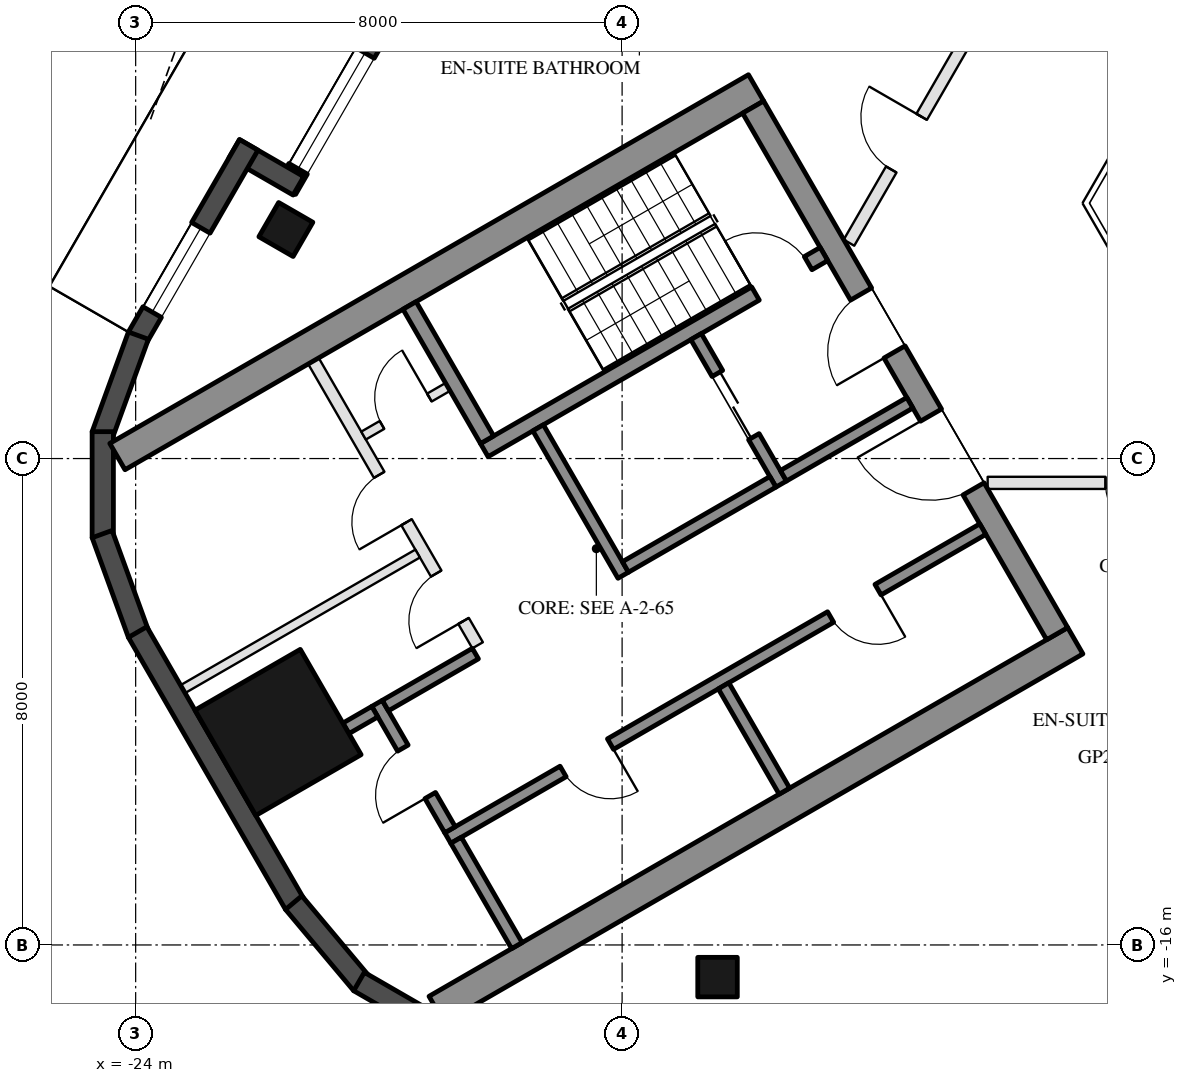
"""IFC4 building model, lengths in metres.
Left out: names, types, materials, properties, quantities, classifications, styles, units other than length and angle.
Written with IfcOpenShell. Run it as: python <this file> out.ifc"""

import sys

from ifc_helpers import new_model, si_unit, direction, frame, frame_2d, origin, origin_2d, place, context, subcontext, project, spatial, rectangle, hollow_rectangle, extrude, boolean, halfspace, element, fill, save


model = new_model("IFC4")
c1 = context("Model", 3, precision=1e-05, world=origin(), true_north=direction((0.0, 1.0)))
c2 = subcontext(c1, "Body", "Model", "MODEL_VIEW")
j1 = project(units=[si_unit("LENGTHUNIT", "METRE"), si_unit("PLANEANGLEUNIT", "RADIAN")], contexts=[c1])
p1 = place(None, origin())
s1 = spatial("IfcSite", under=j1, at=p1, CompositionType="ELEMENT")
p2 = place(p1, origin())
s2 = spatial("IfcBuilding", under=s1, at=p2, CompositionType="ELEMENT")
p3 = place(p2, frame((0.0, 0.0, 283.7)))
s3 = spatial("IfcBuildingStorey", under=s2, at=p3, CompositionType="ELEMENT", Elevation=283.7)
for number, where, z_axis, x_axis in (
    (1, (-14.431, -16.529, 0.0), (0.0, 0.0, 1.0), (-1.0, 0.0, 0.0)),
    (2, (-21.53, -4.233, 0.0), (0.0, 0.0, 1.0), (0.5, 0.866, 0.0)),
):
    element("IfcColumn", number, at=place(p3, frame(where, z_axis=z_axis, x_axis=x_axis)), inside=s3, PredefinedType="COLUMN", context=c2, shape_type="SweptSolid", body=[
        boolean("DIFFERENCE", extrude(hollow_rectangle(XDim=0.65, YDim=0.65, WallThickness=0.03, at=origin_2d()), origin(), (0.0, 0.0, 1.0), 3.7), halfspace(frame((0.0, 0.0, 3.653), z_axis=(0.0, 0.0, 1.0), x_axis=(1.0, 0.0, 0.0)), False)),
    ])
p4 = place(p3, frame((-21.658, -12.504, 0.0), z_axis=(0.0, 0.0, 1.0), x_axis=(-0.5, 0.866025403784, 0.0)))
e3 = element("IfcColumn", 3, at=p4, inside=s3, PredefinedType="COLUMN", context=c2, shape_type="SweptSolid", body=[
    boolean("DIFFERENCE", extrude(hollow_rectangle(XDim=2.0, YDim=2.0, WallThickness=0.05, at=origin_2d()), origin(), (0.0, 0.0, 1.0), 3.7), halfspace(frame((0.0, 0.0, 3.587), z_axis=(0.0, 0.0, 1.0), x_axis=(1.0, 0.0, 0.0)), False)),
])
p5 = place(p3, frame((-18.493, 1.676, 0.0), z_axis=(0.0, 0.0, 1.0), x_axis=(-0.499985371027, -0.866033849661, 0.0)))
e4 = element("IfcWall", 4, at=p5, inside=s3, PredefinedType="SOLIDWALL", context=c2, shape_type="SweptSolid", body=[
    extrude(rectangle(XDim=6.055, YDim=0.35, at=frame_2d((3.028, 0.0))), origin(), (0.0, 0.0, 1.0), 3.55),
])
p6 = place(p5, frame((0.77, 0.0, 0.0)))
e5 = element("IfcOpeningElement", 5, at=p6, cuts=e4, PredefinedType="OPENING", context=c2, shape_type="SweptSolid", body=[
    extrude(rectangle(XDim=2.4, YDim=2.4, at=frame_2d((1.2, 1.2))), frame((0.0, 0.185, 0.0), z_axis=(0.0, -1.0, 0.0), x_axis=(1.0, 0.0, 0.0)), (0.0, 0.0, 1.0), 0.37),
])
p7 = place(p5, frame((3.47, 0.0, 0.3)))
e6 = element("IfcOpeningElement", 6, at=p7, cuts=e4, PredefinedType="OPENING", context=c2, shape_type="SweptSolid", body=[
    extrude(rectangle(XDim=2.2, YDim=2.65, at=frame_2d((1.1, 1.325))), frame((0.0, 0.185, 0.0), z_axis=(0.0, -1.0, 0.0), x_axis=(1.0, 0.0, 0.0)), (0.0, 0.0, 1.0), 0.37),
])
p8 = place(p3, frame((-21.323, -3.515, 0.0), z_axis=(0.0, 0.0, 1.0), x_axis=(-0.866092288191, 0.499884134912, 0.0)))
e7 = element("IfcWall", 7, at=p8, inside=s3, PredefinedType="SOLIDWALL", context=c2, shape_type="SweptSolid", body=[
    extrude(rectangle(XDim=1.22, YDim=0.35, at=frame_2d((0.61, 0.0))), origin(), (0.0, 0.0, 1.0), 3.55),
])
p9 = place(p3, frame((-22.14, -2.841, 0.0), z_axis=(0.0, 0.0, 1.0), x_axis=(-0.500040506767, -0.866002015928, 0.0)))
e8 = element("IfcWall", 8, at=p9, inside=s3, PredefinedType="SOLIDWALL", context=c2, shape_type="SweptSolid", body=[
    extrude(rectangle(XDim=3.655, YDim=0.35, at=frame_2d((1.827, 0.0))), origin(), (0.0, 0.0, 1.0), 3.55),
])
p10 = place(p9, frame((1.575, 0.0, 0.3)))
e9 = element("IfcOpeningElement", 9, at=p10, cuts=e8, PredefinedType="OPENING", context=c2, shape_type="SweptSolid", body=[
    extrude(rectangle(XDim=1.6, YDim=2.65, at=frame_2d((0.8, 1.325))), frame((0.0, 0.185, 0.0), z_axis=(0.0, -1.0, 0.0), x_axis=(1.0, 0.0, 0.0)), (0.0, 0.0, 1.0), 0.37),
])
for number, where, z_axis, x_axis in (
    (10, (-23.955, -5.978, 0.0), (0.0, 0.0, 1.0), (-0.342, -0.94, 0.0)),
    (11, (-24.541, -7.558, 0.0), (0.0, 0.0, 1.0), (0.0, -1.0, 0.0)),
    (12, (-24.552, -9.242, 0.0), (0.0, 0.0, 1.0), (0.342, -0.94, 0.0)),
):
    element("IfcWall", number, at=place(p3, frame(where, z_axis=z_axis, x_axis=x_axis)), inside=s3, PredefinedType="SOLIDWALL", context=c2, shape_type="SweptSolid", body=[
        extrude(rectangle(XDim=1.745, YDim=0.35, at=frame_2d((0.872, 0.0))), origin(), (0.0, 0.0, 1.0), 3.55),
    ])
p11 = place(p3, frame((-23.968, -10.854, 0.0), z_axis=(0.0, 0.0, 1.0), x_axis=(0.500020983425, -0.866013288659, 0.0)))
e13 = element("IfcWall", 13, at=p11, inside=s3, PredefinedType="SOLIDWALL", context=c2, shape_type="SweptSolid", body=[
    extrude(rectangle(XDim=5.168, YDim=0.35, at=frame_2d((2.584, 0.0))), origin(), (0.0, 0.0, 1.0), 3.55),
])
for number, where, z_axis, x_axis in (
    (14, (-21.401, -15.305, 0.0), (0.0, 0.0, 1.0), (0.643, -0.766, 0.0)),
    (15, (-20.327, -16.602, 0.0), (0.0, 0.0, 1.0), (0.866, -0.5, 0.0)),
):
    element("IfcWall", number, at=place(p3, frame(where, z_axis=z_axis, x_axis=x_axis)), inside=s3, PredefinedType="SOLIDWALL", context=c2, shape_type="SweptSolid", body=[
        extrude(rectangle(XDim=1.745, YDim=0.35, at=frame_2d((0.872, 0.0))), origin(), (0.0, 0.0, 1.0), 3.55),
    ])
for number, where, z_axis, x_axis in (
    (16, (-13.797, -1.903, 0.0), (0.0, 0.0, 1.0), (-0.866, -0.5, 0.0)),
    (17, (-8.547, -10.997, 0.0), (0.0, 0.0, 1.0), (-0.866, -0.5, 0.0)),
):
    element("IfcWall", number, at=place(p3, frame(where, z_axis=z_axis, x_axis=x_axis)), inside=s3, PredefinedType="SHEAR", context=c2, shape_type="SweptSolid", body=[
        extrude(rectangle(XDim=12.129, YDim=0.5, at=frame_2d((6.064, 0.0))), origin(), (0.0, 0.0, 1.0), 3.5),
    ])
p12 = place(p3, frame((-13.845, -2.22, 0.0), z_axis=(0.0, 0.0, 1.0), x_axis=(0.500004234368, -0.866022959057, 0.0)))
e18 = element("IfcWall", 18, at=p12, inside=s3, PredefinedType="SHEAR", context=c2, shape_type="SweptSolid", body=[
    extrude(rectangle(XDim=10.0, YDim=0.4, at=frame_2d((5.0, 0.0))), origin(), (0.0, 0.0, 1.0), 3.5),
])
p13 = place(p12, frame((3.55, 0.0, 0.0)))
e19 = element("IfcOpeningElement", 19, at=p13, cuts=e18, PredefinedType="OPENING", context=c2, shape_type="SweptSolid", body=[
    extrude(rectangle(XDim=1.1, YDim=2.1, at=frame_2d((0.55, 1.05))), frame((0.0, 0.21, 0.0), z_axis=(0.0, -1.0, 0.0), x_axis=(1.0, 0.0, 0.0)), (0.0, 0.0, 1.0), 0.42),
])
p14 = place(p12, frame((5.85, 0.0, 0.0)))
e20 = element("IfcOpeningElement", 20, at=p14, cuts=e18, PredefinedType="OPENING", context=c2, shape_type="SweptSolid", body=[
    extrude(rectangle(XDim=1.4, YDim=2.1, at=frame_2d((0.7, 1.05))), frame((0.0, 0.21, 0.0), z_axis=(0.0, -1.0, 0.0), x_axis=(1.0, 0.0, 0.0)), (0.0, 0.0, 1.0), 0.42),
])
p15 = place(p3, frame((-12.681, -4.636, 0.0), z_axis=(0.0, 0.0, 1.0), x_axis=(-0.866021702275, -0.500006411147, 0.0)))
e21 = element("IfcWall", 21, at=p15, inside=s3, PredefinedType="SHEAR", context=c2, shape_type="SweptSolid", body=[
    extrude(rectangle(XDim=6.45, YDim=0.25, at=frame_2d((3.225, 0.0))), origin(), (0.0, 0.0, 1.0), 3.5),
])
p16 = place(p15, frame((0.3, 0.0, 0.0)))
e22 = element("IfcOpeningElement", 22, at=p16, cuts=e21, PredefinedType="OPENING", context=c2, shape_type="SweptSolid", body=[
    extrude(rectangle(XDim=1.0, YDim=2.1, at=frame_2d((0.5, 1.05))), frame((0.0, 0.135, 0.0), z_axis=(0.0, -1.0, 0.0), x_axis=(1.0, 0.0, 0.0)), (0.0, 0.0, 1.0), 0.27),
])
p17 = place(p3, frame((-19.496, -5.482, 0.0), z_axis=(0.0, 0.0, 1.0), x_axis=(0.499990435942, -0.866030925526, 0.0)))
e23 = element("IfcWall", 23, at=p17, inside=s3, PredefinedType="SHEAR", context=c2, shape_type="SweptSolid", body=[
    extrude(rectangle(XDim=2.55, YDim=0.25, at=frame_2d((1.275, 0.0))), origin(), (0.0, 0.0, 1.0), 3.5),
])
p18 = place(p3, frame((-17.381, -7.495, 0.0), z_axis=(0.0, 0.0, 1.0), x_axis=(0.500011755427, -0.866018616679, 0.0)))
e24 = element("IfcWall", 24, at=p18, inside=s3, PredefinedType="SHEAR", context=c2, shape_type="SweptSolid", body=[
    extrude(rectangle(XDim=2.8, YDim=0.2, at=frame_2d((1.4, 0.0))), origin(), (0.0, 0.0, 1.0), 3.5),
])
p19 = place(p3, frame((-14.783, -5.995, 0.0), z_axis=(0.0, 0.0, 1.0), x_axis=(0.49994636267, -0.866056369097, 0.0)))
e25 = element("IfcWall", 25, at=p19, inside=s3, PredefinedType="SHEAR", context=c2, shape_type="SweptSolid", body=[
    extrude(rectangle(XDim=2.8, YDim=0.2, at=frame_2d((1.4, 0.0))), origin(), (0.0, 0.0, 1.0), 3.5),
])
p20 = place(p19, frame((0.7, 0.0, 0.0)))
e26 = element("IfcOpeningElement", 26, at=p20, cuts=e25, PredefinedType="OPENING", context=c2, shape_type="SweptSolid", body=[
    extrude(rectangle(XDim=1.2, YDim=2.1, at=frame_2d((0.6, 1.05))), frame((0.0, 0.11, 0.0), z_axis=(0.0, -1.0, 0.0), x_axis=(1.0, 0.0, 0.0)), (0.0, 0.0, 1.0), 0.22),
])
p21 = place(p3, frame((-13.52, -8.383, 0.0), z_axis=(0.0, 0.0, 1.0), x_axis=(-0.866034573852, -0.49998411664, 0.0)))
e27 = element("IfcWall", 27, at=p21, inside=s3, PredefinedType="SHEAR", context=c2, shape_type="SweptSolid", body=[
    extrude(rectangle(XDim=2.8, YDim=0.2, at=frame_2d((1.4, 0.0))), origin(), (0.0, 0.0, 1.0), 3.5),
])
p22 = place(p3, frame((-11.268, -7.083, 0.0), z_axis=(0.0, 0.0, 1.0), x_axis=(-0.866050077142, -0.499957262057, 0.0)))
e28 = element("IfcWall", 28, at=p22, inside=s3, PredefinedType="SHEAR", context=c2, shape_type="SweptSolid", body=[
    extrude(rectangle(XDim=2.4, YDim=0.2, at=frame_2d((1.2, 0.0))), origin(), (0.0, 0.0, 1.0), 3.5),
])
p23 = place(p3, frame((-10.068, -9.162, 0.0), z_axis=(0.0, 0.0, 1.0), x_axis=(-0.866032725843, -0.499987317609, 0.0)))
e29 = element("IfcWall", 29, at=p23, inside=s3, PredefinedType="SHEAR", context=c2, shape_type="SweptSolid", body=[
    extrude(rectangle(XDim=10.16, YDim=0.2, at=frame_2d((5.08, 0.0))), origin(), (0.0, 0.0, 1.0), 3.5),
])
p24 = place(p23, frame((1.99, 0.0, 0.0)))
e30 = element("IfcOpeningElement", 30, at=p24, cuts=e29, PredefinedType="OPENING", context=c2, shape_type="SweptSolid", body=[
    extrude(rectangle(XDim=0.9, YDim=2.1, at=frame_2d((0.45, 1.05))), frame((0.0, 0.11, 0.0), z_axis=(0.0, -1.0, 0.0), x_axis=(1.0, 0.0, 0.0)), (0.0, 0.0, 1.0), 0.22),
])
p25 = place(p23, frame((7.07, 0.0, 0.0)))
e31 = element("IfcOpeningElement", 31, at=p25, cuts=e29, PredefinedType="OPENING", context=c2, shape_type="SweptSolid", body=[
    extrude(rectangle(XDim=0.9, YDim=2.1, at=frame_2d((0.45, 1.05))), frame((0.0, 0.11, 0.0), z_axis=(0.0, -1.0, 0.0), x_axis=(1.0, 0.0, 0.0)), (0.0, 0.0, 1.0), 0.22),
])
p26 = place(p3, frame((-20.031, -12.026, 0.0), z_axis=(0.0, 0.0, 1.0), x_axis=(0.500033551112, -0.866006032174, 0.0)))
e32 = element("IfcWall", 32, at=p26, inside=s3, PredefinedType="SHEAR", context=c2, shape_type="SweptSolid", body=[
    extrude(rectangle(XDim=2.4, YDim=0.2, at=frame_2d((1.2, 0.0))), origin(), (0.0, 0.0, 1.0), 3.5),
])
p27 = place(p26, frame((0.85, 0.0, 0.0)))
e33 = element("IfcOpeningElement", 33, at=p27, cuts=e32, PredefinedType="OPENING", context=c2, shape_type="SweptSolid", body=[
    extrude(rectangle(XDim=0.9, YDim=2.1, at=frame_2d((0.45, 1.05))), frame((0.0, 0.11, 0.0), z_axis=(0.0, -1.0, 0.0), x_axis=(1.0, 0.0, 0.0)), (0.0, 0.0, 1.0), 0.22),
])
p28 = place(p3, frame((-18.413, -11.208, 0.0), z_axis=(0.0, 0.0, 1.0), x_axis=(-0.866038183914, -0.499977863513, 0.0)))
e34 = element("IfcWall", 34, at=p28, inside=s3, PredefinedType="SHEAR", context=c2, shape_type="SweptSolid", body=[
    extrude(rectangle(XDim=1.71, YDim=0.2, at=frame_2d((0.855, 0.0))), origin(), (0.0, 0.0, 1.0), 3.5),
])
for number, where, z_axis, x_axis in (
    (35, (-14.331, -11.738, 0.0), (0.0, 0.0, 1.0), (0.5, -0.866, 0.0)),
    (36, (-18.73, -14.278, 0.0), (0.0, 0.0, 1.0), (0.5, -0.866, 0.0)),
):
    element("IfcWall", number, at=place(p3, frame(where, z_axis=z_axis, x_axis=x_axis)), inside=s3, PredefinedType="SHEAR", context=c2, shape_type="SweptSolid", body=[
        extrude(rectangle(XDim=2.0, YDim=0.2, at=frame_2d((1.0, 0.0))), origin(), (0.0, 0.0, 1.0), 3.5),
    ])
p29 = place(p3, frame((-20.067, -12.163, 0.0), z_axis=(0.0, 0.0, 1.0), x_axis=(-0.866044851585, -0.499966313909, 0.0)))
e37 = element("IfcWall", 37, at=p29, inside=s3, PredefinedType="SHEAR", context=c2, shape_type="SweptSolid", body=[
    extrude(rectangle(XDim=0.549, YDim=0.2, at=frame_2d((0.274, 0.0))), origin(), (0.0, 0.0, 1.0), 3.5),
])
p30 = place(p3, frame((-21.076, -6.395, 0.0), z_axis=(0.0, 0.0, 1.0), x_axis=(0.50001468107, -0.866016927499, 0.0)))
e38 = element("IfcWall", 38, at=p30, inside=s3, PredefinedType="PARTITIONING", context=c2, shape_type="SweptSolid", body=[
    extrude(rectangle(XDim=5.4, YDim=0.2, at=frame_2d((2.7, 0.0))), origin(), (0.0, 0.0, 1.0), 3.5),
])
p31 = place(p30, frame((2.163, 0.0, 0.0)))
e39 = element("IfcOpeningElement", 39, at=p31, cuts=e38, PredefinedType="OPENING", context=c2, shape_type="SweptSolid", body=[
    extrude(rectangle(XDim=0.9, YDim=2.1, at=frame_2d((0.45, 1.05))), frame((0.0, 0.11, 0.0), z_axis=(0.0, -1.0, 0.0), x_axis=(1.0, 0.0, 0.0)), (0.0, 0.0, 1.0), 0.22),
])
p32 = place(p30, frame((4.038, 0.0, 0.0)))
e40 = element("IfcOpeningElement", 40, at=p32, cuts=e38, PredefinedType="OPENING", context=c2, shape_type="SweptSolid", body=[
    extrude(rectangle(XDim=0.9, YDim=2.1, at=frame_2d((0.45, 1.05))), frame((0.0, 0.11, 0.0), z_axis=(0.0, -1.0, 0.0), x_axis=(1.0, 0.0, 0.0)), (0.0, 0.0, 1.0), 0.22),
])
p33 = place(p3, frame((-18.866, -6.822, 0.0), z_axis=(0.0, 0.0, 1.0), x_axis=(-0.866028054938, -0.499995408039, 0.0)))
e41 = element("IfcWall", 41, at=p33, inside=s3, PredefinedType="PARTITIONING", context=c2, shape_type="SweptSolid", body=[
    extrude(rectangle(XDim=1.6, YDim=0.15, at=frame_2d((0.8, 0.0))), origin(), (0.0, 0.0, 1.0), 3.5),
])
p34 = place(p33, frame((0.35, 0.0, 0.0)))
e42 = element("IfcOpeningElement", 42, at=p34, cuts=e41, PredefinedType="OPENING", context=c2, shape_type="SweptSolid", body=[
    extrude(rectangle(XDim=0.9, YDim=2.1, at=frame_2d((0.45, 1.05))), frame((0.0, 0.085, 0.0), z_axis=(0.0, -1.0, 0.0), x_axis=(1.0, 0.0, 0.0)), (0.0, 0.0, 1.0), 0.17),
])
p35 = place(p3, frame((-19.363, -9.562, 0.0), z_axis=(0.0, 0.0, 1.0), x_axis=(-0.866024199568, -0.500002085759, 0.0)))
e43 = element("IfcWall", 43, at=p35, inside=s3, PredefinedType="PARTITIONING", context=c2, shape_type="SweptSolid", body=[
    extrude(rectangle(XDim=4.459, YDim=0.15, at=frame_2d((2.229, 0.0))), origin(), (0.0, 0.0, 1.0), 3.5),
])
p36 = place(p3, frame((-5.0, -8.4, 0.0), z_axis=(0.0, 0.0, 1.0), x_axis=(-1.0, 0.0, 0.0)))
e44 = element("IfcWall", 44, at=p36, inside=s3, PredefinedType="PARTITIONING", context=c2, shape_type="SweptSolid", body=[
    extrude(rectangle(XDim=4.988, YDim=0.2, at=frame_2d((2.494, 0.0))), origin(), (0.0, 0.0, 1.0), 3.05),
])
p37 = place(p36, frame((2.05, 0.0, 0.0)))
e45 = element("IfcOpeningElement", 45, at=p37, cuts=e44, PredefinedType="OPENING", context=c2, shape_type="SweptSolid", body=[
    extrude(rectangle(XDim=1.0, YDim=2.1, at=frame_2d((0.5, 1.05))), frame((0.0, 0.11, 0.0), z_axis=(0.0, -1.0, 0.0), x_axis=(1.0, 0.0, 0.0)), (0.0, 0.0, 1.0), 0.22),
])
p38 = place(p3, frame((-12.269, -4.45, 0.0), z_axis=(0.0, 0.0, 1.0), x_axis=(0.500000040646, 0.866025380318, 0.0)))
e46 = element("IfcWall", 46, at=p38, inside=s3, PredefinedType="PARTITIONING", context=c2, shape_type="SweptSolid", body=[
    extrude(rectangle(XDim=3.781, YDim=0.2, at=frame_2d((1.891, 0.0))), origin(), (0.0, 0.0, 1.0), 3.05),
])
p39 = place(p38, frame((1.391, 0.0, 0.0)))
e47 = element("IfcOpeningElement", 47, at=p39, cuts=e46, PredefinedType="OPENING", context=c2, shape_type="SweptSolid", body=[
    extrude(rectangle(XDim=1.0, YDim=2.1, at=frame_2d((0.5, 1.05))), frame((0.0, 0.11, 0.0), z_axis=(0.0, -1.0, 0.0), x_axis=(1.0, 0.0, 0.0)), (0.0, 0.0, 1.0), 0.22),
])
p40 = place(p7, origin())
e48 = element("IfcWindow", 48, at=p40, inside=s3, PartitioningType="SINGLE_PANEL", PredefinedType="WINDOW", context=c2, shape_type="SweptSolid", body=[
    extrude(rectangle(XDim=2.2, YDim=2.65, at=frame_2d((1.1, 1.325))), frame((0.0, 0.03, 0.0), z_axis=(0.0, -1.0, 0.0), x_axis=(1.0, 0.0, 0.0)), (0.0, 0.0, 1.0), 0.06),
])
fill(e6, e48)
p41 = place(p10, origin())
e49 = element("IfcWindow", 49, at=p41, inside=s3, PartitioningType="SINGLE_PANEL", PredefinedType="WINDOW", context=c2, shape_type="SweptSolid", body=[
    extrude(rectangle(XDim=1.6, YDim=2.65, at=frame_2d((0.8, 1.325))), frame((0.0, 0.03, 0.0), z_axis=(0.0, -1.0, 0.0), x_axis=(1.0, 0.0, 0.0)), (0.0, 0.0, 1.0), 0.06),
])
fill(e9, e49)
p42 = place(p20, origin())
e50 = element("IfcDoor", 50, at=p42, inside=s3, OperationType="DOUBLE_DOOR_SLIDING", PredefinedType="DOOR", context=c2, shape_type="SweptSolid", body=[
    extrude(rectangle(XDim=1.2, YDim=2.1, at=frame_2d((0.6, 1.05))), frame((0.0, 0.025, 0.0), z_axis=(0.0, -1.0, 0.0), x_axis=(1.0, 0.0, 0.0)), (0.0, 0.0, 1.0), 0.05),
])
fill(e26, e50)
p43 = place(p34, frame((0.9, 0.0, 0.0), z_axis=(0.0, 0.0, 1.0), x_axis=(-1.0, 0.0, 0.0)))
e51 = element("IfcDoor", 51, at=p43, inside=s3, OperationType="SINGLE_SWING_RIGHT", PredefinedType="DOOR", context=c2, shape_type="SweptSolid", body=[
    extrude(rectangle(XDim=0.9, YDim=2.1, at=frame_2d((0.45, 1.05))), frame((0.0, 0.025, 0.0), z_axis=(0.0, -1.0, 0.0), x_axis=(1.0, 0.0, 0.0)), (0.0, 0.0, 1.0), 0.05),
])
fill(e42, e51)
p44 = place(p24, origin())
e52 = element("IfcDoor", 52, at=p44, inside=s3, OperationType="SINGLE_SWING_LEFT", PredefinedType="DOOR", context=c2, shape_type="SweptSolid", body=[
    extrude(rectangle(XDim=0.9, YDim=2.1, at=frame_2d((0.45, 1.05))), frame((0.0, 0.025, 0.0), z_axis=(0.0, -1.0, 0.0), x_axis=(1.0, 0.0, 0.0)), (0.0, 0.0, 1.0), 0.05),
])
fill(e30, e52)
p45 = place(p25, origin())
e53 = element("IfcDoor", 53, at=p45, inside=s3, OperationType="SINGLE_SWING_LEFT", PredefinedType="DOOR", context=c2, shape_type="SweptSolid", body=[
    extrude(rectangle(XDim=0.9, YDim=2.1, at=frame_2d((0.45, 1.05))), frame((0.0, 0.025, 0.0), z_axis=(0.0, -1.0, 0.0), x_axis=(1.0, 0.0, 0.0)), (0.0, 0.0, 1.0), 0.05),
])
fill(e31, e53)
p46 = place(p27, frame((0.9, 0.0, 0.0), z_axis=(0.0, 0.0, 1.0), x_axis=(-1.0, 0.0, 0.0)))
e54 = element("IfcDoor", 54, at=p46, inside=s3, OperationType="SINGLE_SWING_LEFT", PredefinedType="DOOR", context=c2, shape_type="SweptSolid", body=[
    extrude(rectangle(XDim=0.9, YDim=2.1, at=frame_2d((0.45, 1.05))), frame((0.0, 0.025, 0.0), z_axis=(0.0, -1.0, 0.0), x_axis=(1.0, 0.0, 0.0)), (0.0, 0.0, 1.0), 0.05),
])
fill(e33, e54)
p47 = place(p31, frame((0.9, 0.0, 0.0), z_axis=(0.0, 0.0, 1.0), x_axis=(-1.0, 0.0, 0.0)))
e55 = element("IfcDoor", 55, at=p47, inside=s3, OperationType="SINGLE_SWING_LEFT", PredefinedType="DOOR", context=c2, shape_type="SweptSolid", body=[
    extrude(rectangle(XDim=0.9, YDim=2.1, at=frame_2d((0.45, 1.05))), frame((0.0, 0.025, 0.0), z_axis=(0.0, -1.0, 0.0), x_axis=(1.0, 0.0, 0.0)), (0.0, 0.0, 1.0), 0.05),
])
fill(e39, e55)
p48 = place(p32, frame((0.9, 0.0, 0.0), z_axis=(0.0, 0.0, 1.0), x_axis=(-1.0, 0.0, 0.0)))
e56 = element("IfcDoor", 56, at=p48, inside=s3, OperationType="SINGLE_SWING_LEFT", PredefinedType="DOOR", context=c2, shape_type="SweptSolid", body=[
    extrude(rectangle(XDim=0.9, YDim=2.1, at=frame_2d((0.45, 1.05))), frame((0.0, 0.025, 0.0), z_axis=(0.0, -1.0, 0.0), x_axis=(1.0, 0.0, 0.0)), (0.0, 0.0, 1.0), 0.05),
])
fill(e40, e56)
p49 = place(p13, frame((1.1, 0.0, 0.0), z_axis=(0.0, 0.0, 1.0), x_axis=(-1.0, 0.0, 0.0)))
e57 = element("IfcDoor", 57, at=p49, inside=s3, OperationType="SINGLE_SWING_LEFT", PredefinedType="DOOR", context=c2, shape_type="SweptSolid", body=[
    extrude(rectangle(XDim=1.1, YDim=2.1, at=frame_2d((0.55, 1.05))), frame((0.0, 0.025, 0.0), z_axis=(0.0, -1.0, 0.0), x_axis=(1.0, 0.0, 0.0)), (0.0, 0.0, 1.0), 0.05),
])
fill(e19, e57)
p50 = place(p14, frame((1.4, 0.0, 0.0), z_axis=(0.0, 0.0, 1.0), x_axis=(-1.0, 0.0, 0.0)))
e58 = element("IfcDoor", 58, at=p50, inside=s3, OperationType="DOUBLE_DOOR_SINGLE_SWING", PredefinedType="DOOR", context=c2, shape_type="SweptSolid", body=[
    extrude(rectangle(XDim=1.4, YDim=2.1, at=frame_2d((0.7, 1.05))), frame((0.0, 0.025, 0.0), z_axis=(0.0, -1.0, 0.0), x_axis=(1.0, 0.0, 0.0)), (0.0, 0.0, 1.0), 0.05),
])
fill(e20, e58)
p51 = place(p16, frame((1.0, 0.0, 0.0), z_axis=(0.0, 0.0, 1.0), x_axis=(-1.0, 0.0, 0.0)))
e59 = element("IfcDoor", 59, at=p51, inside=s3, OperationType="SINGLE_SWING_LEFT", PredefinedType="DOOR", context=c2, shape_type="SweptSolid", body=[
    extrude(rectangle(XDim=1.0, YDim=2.1, at=frame_2d((0.5, 1.05))), frame((0.0, 0.025, 0.0), z_axis=(0.0, -1.0, 0.0), x_axis=(1.0, 0.0, 0.0)), (0.0, 0.0, 1.0), 0.05),
])
fill(e22, e59)
p52 = place(p37, origin())
e60 = element("IfcDoor", 60, at=p52, inside=s3, OperationType="SINGLE_SWING_LEFT", PredefinedType="DOOR", context=c2, shape_type="SweptSolid", body=[
    extrude(rectangle(XDim=1.0, YDim=2.1, at=frame_2d((0.5, 1.05))), frame((0.0, 0.025, 0.0), z_axis=(0.0, -1.0, 0.0), x_axis=(1.0, 0.0, 0.0)), (0.0, 0.0, 1.0), 0.05),
])
fill(e45, e60)
p53 = place(p39, origin())
e61 = element("IfcDoor", 61, at=p53, inside=s3, OperationType="SINGLE_SWING_RIGHT", PredefinedType="DOOR", context=c2, shape_type="SweptSolid", body=[
    extrude(rectangle(XDim=1.0, YDim=2.1, at=frame_2d((0.5, 1.05))), frame((0.0, 0.025, 0.0), z_axis=(0.0, -1.0, 0.0), x_axis=(1.0, 0.0, 0.0)), (0.0, 0.0, 1.0), 0.05),
])
fill(e47, e61)
save(model, sys.argv[1])
